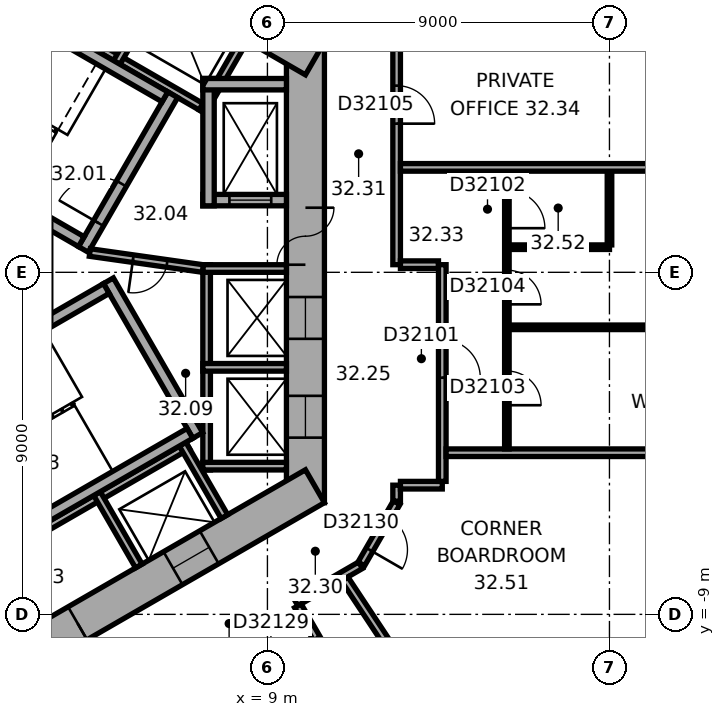
"""IFC4 building model, lengths in metres.
Left out: names, types, materials, properties, quantities, classifications, styles, units other than length and angle.
Written with IfcOpenShell. Run it as: python <this file> out.ifc"""

import sys

from ifc_helpers import new_model, si_unit, direction, frame, frame_2d, origin, place, context, subcontext, project, spatial, rectangle, extrude, element, fill, save


model = new_model("IFC4")
c1 = context("Model", 3, precision=1e-05, world=origin(), true_north=direction((0.0, 1.0)))
c2 = subcontext(c1, "Body", "Model", "MODEL_VIEW")
j1 = project(units=[si_unit("LENGTHUNIT", "METRE"), si_unit("PLANEANGLEUNIT", "RADIAN")], contexts=[c1])
p1 = place(None, origin())
s1 = spatial("IfcSite", under=j1, at=p1, CompositionType="ELEMENT")
p2 = place(p1, origin())
s2 = spatial("IfcBuilding", under=s1, at=p2, CompositionType="ELEMENT")
p3 = place(p2, frame((0.0, 0.0, 131.8)))
s3 = spatial("IfcBuildingStorey", under=s2, at=p3, CompositionType="ELEMENT", Elevation=131.8)
p4 = place(p3, frame((10.0, -6.062, 0.0), z_axis=(0.0, 0.0, 1.0), x_axis=(0.0, 1.0, 0.0)))
e1 = element("IfcWall", 1, at=p4, inside=s3, PredefinedType="SHEAR", context=c2, shape_type="SweptSolid", body=[
    extrude(rectangle(XDim=12.125, YDim=1.0, at=frame_2d((6.062, 0.0))), origin(), (0.0, 0.0, 1.0), 3.7),
])
p5 = place(p4, frame((6.262, 0.0, 0.0)))
e2 = element("IfcOpeningElement", 2, at=p5, cuts=e1, PredefinedType="OPENING", context=c2, shape_type="SweptSolid", body=[
    extrude(rectangle(XDim=1.5, YDim=2.1, at=frame_2d((0.75, 1.05))), frame((0.0, 0.51, 0.0), z_axis=(0.0, -1.0, 0.0), x_axis=(1.0, 0.0, 0.0)), (0.0, 0.0, 1.0), 1.02),
])
p6 = place(p4, frame((1.712, 0.0, 0.0)))
e3 = element("IfcOpeningElement", 3, at=p6, cuts=e1, PredefinedType="OPENING", context=c2, shape_type="SweptSolid", body=[
    extrude(rectangle(XDim=1.1, YDim=2.1, at=frame_2d((0.55, 1.05))), frame((0.0, 0.51, 0.0), z_axis=(0.0, -1.0, 0.0), x_axis=(1.0, 0.0, 0.0)), (0.0, 0.0, 1.0), 1.02),
])
p7 = place(p4, frame((4.312, 0.0, 0.0)))
e4 = element("IfcOpeningElement", 4, at=p7, cuts=e1, PredefinedType="OPENING", context=c2, shape_type="SweptSolid", body=[
    extrude(rectangle(XDim=1.1, YDim=2.1, at=frame_2d((0.55, 1.05))), frame((0.0, 0.51, 0.0), z_axis=(0.0, -1.0, 0.0), x_axis=(1.0, 0.0, 0.0)), (0.0, 0.0, 1.0), 1.02),
])
p8 = place(p3, frame((10.25, 5.629, 0.0), z_axis=(0.0, 0.0, 1.0), x_axis=(-0.866022616891, 0.50000482701, 0.0)))
e5 = element("IfcWall", 5, at=p8, inside=s3, PredefinedType="SHEAR", context=c2, shape_type="SweptSolid", body=[
    extrude(rectangle(XDim=12.125, YDim=1.0, at=frame_2d((6.062, 0.0))), origin(), (0.0, 0.0, 1.0), 3.7),
])
p9 = place(p8, frame((2.612, 0.0, 0.0)))
e6 = element("IfcOpeningElement", 6, at=p9, cuts=e5, PredefinedType="OPENING", context=c2, shape_type="SweptSolid", body=[
    extrude(rectangle(XDim=1.1, YDim=2.1, at=frame_2d((0.55, 1.05))), frame((0.0, 0.51, 0.0), z_axis=(0.0, -1.0, 0.0), x_axis=(1.0, 0.0, 0.0)), (0.0, 0.0, 1.0), 1.02),
])
p10 = place(p8, frame((5.212, 0.0, 0.0)))
e7 = element("IfcOpeningElement", 7, at=p10, cuts=e5, PredefinedType="OPENING", context=c2, shape_type="SweptSolid", body=[
    extrude(rectangle(XDim=1.1, YDim=2.1, at=frame_2d((0.55, 1.05))), frame((0.0, 0.51, 0.0), z_axis=(0.0, -1.0, 0.0), x_axis=(1.0, 0.0, 0.0)), (0.0, 0.0, 1.0), 1.02),
])
p11 = place(p8, frame((7.812, 0.0, 0.0)))
e8 = element("IfcOpeningElement", 8, at=p11, cuts=e5, PredefinedType="OPENING", context=c2, shape_type="SweptSolid", body=[
    extrude(rectangle(XDim=1.1, YDim=2.1, at=frame_2d((0.55, 1.05))), frame((0.0, 0.51, 0.0), z_axis=(0.0, -1.0, 0.0), x_axis=(1.0, 0.0, 0.0)), (0.0, 0.0, 1.0), 1.02),
])
p12 = place(p3, frame((-0.25, -11.691, 0.0), z_axis=(0.0, 0.0, 1.0), x_axis=(0.866022616891, 0.50000482701, 0.0)))
e9 = element("IfcWall", 9, at=p12, inside=s3, PredefinedType="SHEAR", context=c2, shape_type="SweptSolid", body=[
    extrude(rectangle(XDim=12.125, YDim=1.0, at=frame_2d((6.062, 0.0))), origin(), (0.0, 0.0, 1.0), 3.7),
])
p13 = place(p12, frame((4.012, 0.0, 0.0)))
e10 = element("IfcOpeningElement", 10, at=p13, cuts=e9, PredefinedType="OPENING", context=c2, shape_type="SweptSolid", body=[
    extrude(rectangle(XDim=0.9, YDim=2.1, at=frame_2d((0.45, 1.05))), frame((0.0, 0.51, 0.0), z_axis=(0.0, -1.0, 0.0), x_axis=(1.0, 0.0, 0.0)), (0.0, 0.0, 1.0), 1.02),
])
p14 = place(p12, frame((7.812, 0.0, 0.0)))
e11 = element("IfcOpeningElement", 11, at=p14, cuts=e9, PredefinedType="OPENING", context=c2, shape_type="SweptSolid", body=[
    extrude(rectangle(XDim=1.1, YDim=2.1, at=frame_2d((0.55, 1.05))), frame((0.0, 0.51, 0.0), z_axis=(0.0, -1.0, 0.0), x_axis=(1.0, 0.0, 0.0)), (0.0, 0.0, 1.0), 1.02),
])
p15 = place(p3, frame((7.4, -5.2, 0.0), z_axis=(0.0, 0.0, 1.0), x_axis=(0.0, 1.0, 0.0)))
e12 = element("IfcWall", 12, at=p15, inside=s3, PredefinedType="PARTITIONING", context=c2, shape_type="SweptSolid", body=[
    extrude(rectangle(XDim=5.4, YDim=0.2, at=frame_2d((2.7, 0.0))), origin(), (0.0, 0.0, 1.0), 3.42),
])
for number, where, z_axis, x_axis in (
    (13, (7.3, -5.1, 0.0), (0.0, 0.0, 1.0), (1.0, 0.0, 0.0)),
    (14, (7.3, -2.5, 0.0), (0.0, 0.0, 1.0), (1.0, 0.0, 0.0)),
    (15, (7.3, 0.1, 0.0), (0.0, 0.0, 1.0), (1.0, 0.0, 0.0)),
):
    element("IfcWall", number, at=place(p3, frame(where, z_axis=z_axis, x_axis=x_axis)), inside=s3, PredefinedType="PARTITIONING", context=c2, shape_type="SweptSolid", body=[
        extrude(rectangle(XDim=2.2, YDim=0.2, at=frame_2d((1.1, 0.0))), origin(), (0.0, 0.0, 1.0), 3.42),
    ])
p16 = place(p3, frame((7.424, 4.259, 0.0), z_axis=(0.0, 0.0, 1.0), x_axis=(-0.866026010844, 0.49999894854, 0.0)))
e16 = element("IfcWall", 16, at=p16, inside=s3, PredefinedType="PARTITIONING", context=c2, shape_type="SweptSolid", body=[
    extrude(rectangle(XDim=8.0, YDim=0.2, at=frame_2d((4.0, 0.0))), origin(), (0.0, 0.0, 1.0), 3.42),
])
for number, where, z_axis, x_axis in (
    (17, (7.287, 4.222, 0.0), (0.0, 0.0, 1.0), (0.5, 0.866, 0.0)),
    (18, (5.036, 5.522, 0.0), (0.0, 0.0, 1.0), (0.5, 0.866, 0.0)),
):
    element("IfcWall", number, at=place(p3, frame(where, z_axis=z_axis, x_axis=x_axis)), inside=s3, PredefinedType="PARTITIONING", context=c2, shape_type="SweptSolid", body=[
        extrude(rectangle(XDim=2.2, YDim=0.2, at=frame_2d((1.1, 0.0))), origin(), (0.0, 0.0, 1.0), 3.42),
    ])
p17 = place(p3, frame((-0.024, -8.559, 0.0), z_axis=(0.0, 0.0, 1.0), x_axis=(0.866026010844, 0.49999894854, 0.0)))
e19 = element("IfcWall", 19, at=p17, inside=s3, PredefinedType="PARTITIONING", context=c2, shape_type="SweptSolid", body=[
    extrude(rectangle(XDim=8.0, YDim=0.2, at=frame_2d((4.0, 0.0))), origin(), (0.0, 0.0, 1.0), 3.42),
])
for number, where, z_axis, x_axis in (
    (20, (4.516, -5.822, 0.0), (0.0, 0.0, 1.0), (0.5, -0.866, 0.0)),
    (21, (6.768, -4.522, 0.0), (0.0, 0.0, 1.0), (0.5, -0.866, 0.0)),
):
    element("IfcWall", number, at=place(p3, frame(where, z_axis=z_axis, x_axis=x_axis)), inside=s3, PredefinedType="PARTITIONING", context=c2, shape_type="SweptSolid", body=[
        extrude(rectangle(XDim=2.2, YDim=0.2, at=frame_2d((1.1, 0.0))), origin(), (0.0, 0.0, 1.0), 3.42),
    ])
p18 = place(p3, frame((4.158, 0.602, 0.0), z_axis=(0.0, 0.0, 1.0), x_axis=(0.499977259774, 0.866038532462, 0.0)))
e22 = element("IfcWall", 22, at=p18, inside=s3, PredefinedType="SHEAR", context=c2, shape_type="SweptSolid", body=[
    extrude(rectangle(XDim=4.7, YDim=0.3, at=frame_2d((2.35, 0.0))), origin(), (0.0, 0.0, 1.0), 3.42),
])
p19 = place(p18, frame((0.8, 0.0, 0.0)))
e23 = element("IfcOpeningElement", 23, at=p19, cuts=e22, PredefinedType="OPENING", context=c2, shape_type="SweptSolid", body=[
    extrude(rectangle(XDim=1.2, YDim=2.1, at=frame_2d((0.6, 1.05))), frame((0.0, 0.16, 0.0), z_axis=(0.0, -1.0, 0.0), x_axis=(1.0, 0.0, 0.0)), (0.0, 0.0, 1.0), 0.32),
])
for number, where, z_axis, x_axis in (
    (24, (4.103, 0.807, 0.0), (0.0, 0.0, 1.0), (-0.866, 0.5, 0.0)),
    (25, (6.303, 4.617, 0.0), (0.0, 0.0, 1.0), (-0.866, 0.5, 0.0)),
):
    element("IfcWall", number, at=place(p3, frame(where, z_axis=z_axis, x_axis=x_axis)), inside=s3, PredefinedType="SHEAR", context=c2, shape_type="SweptSolid", body=[
        extrude(rectangle(XDim=7.06, YDim=0.3, at=frame_2d((3.53, 0.0))), origin(), (0.0, 0.0, 1.0), 3.42),
    ])
p20 = place(p3, frame((4.816, -0.222, 0.0), z_axis=(0.0, 0.0, 1.0), x_axis=(0.499977259774, -0.866038532462, 0.0)))
e26 = element("IfcWall", 26, at=p20, inside=s3, PredefinedType="SHEAR", context=c2, shape_type="SweptSolid", body=[
    extrude(rectangle(XDim=4.7, YDim=0.3, at=frame_2d((2.35, 0.0))), origin(), (0.0, 0.0, 1.0), 3.42),
])
for number, where, z_axis, x_axis in (
    (27, (-1.353, -3.957, 0.0), (0.0, 0.0, 1.0), (0.866, 0.5, 0.0)),
    (28, (0.847, -7.767, 0.0), (0.0, 0.0, 1.0), (0.866, 0.5, 0.0)),
):
    element("IfcWall", number, at=place(p3, frame(where, z_axis=z_axis, x_axis=x_axis)), inside=s3, PredefinedType="SHEAR", context=c2, shape_type="SweptSolid", body=[
        extrude(rectangle(XDim=7.06, YDim=0.3, at=frame_2d((3.53, 0.0))), origin(), (0.0, 0.0, 1.0), 3.42),
    ])
p21 = place(p3, frame((7.3, 1.9, 0.0), z_axis=(0.0, 0.0, 1.0), x_axis=(1.0, 0.0, 0.0)))
e29 = element("IfcWall", 29, at=p21, inside=s3, PredefinedType="SHEAR", context=c2, shape_type="SweptSolid", body=[
    extrude(rectangle(XDim=2.2, YDim=0.3, at=frame_2d((1.1, 0.0))), origin(), (0.0, 0.0, 1.0), 3.42),
])
p22 = place(p21, frame((0.7, 0.0, 0.0)))
e30 = element("IfcOpeningElement", 30, at=p22, cuts=e29, PredefinedType="OPENING", context=c2, shape_type="SweptSolid", body=[
    extrude(rectangle(XDim=1.1, YDim=2.1, at=frame_2d((0.55, 1.05))), frame((0.0, 0.16, 0.0), z_axis=(0.0, -1.0, 0.0), x_axis=(1.0, 0.0, 0.0)), (0.0, 0.0, 1.0), 0.32),
])
p23 = place(p3, frame((7.45, 1.75, 0.0), z_axis=(0.0, 0.0, 1.0), x_axis=(0.0, 1.0, 0.0)))
e31 = element("IfcWall", 31, at=p23, inside=s3, PredefinedType="SHEAR", context=c2, shape_type="SweptSolid", body=[
    extrude(rectangle(XDim=3.35, YDim=0.3, at=frame_2d((1.675, 0.0))), origin(), (0.0, 0.0, 1.0), 3.42),
])
p24 = place(p3, frame((7.3, 4.95, 0.0), z_axis=(0.0, 0.0, 1.0), x_axis=(1.0, 0.0, 0.0)))
e32 = element("IfcWall", 32, at=p24, inside=s3, PredefinedType="SHEAR", context=c2, shape_type="SweptSolid", body=[
    extrude(rectangle(XDim=2.2, YDim=0.3, at=frame_2d((1.1, 0.0))), origin(), (0.0, 0.0, 1.0), 3.42),
])
p25 = place(p3, frame((4.327, 0.521, 0.0), z_axis=(0.0, 0.0, 1.0), x_axis=(0.990124376366, -0.14019172346, 0.0)))
e33 = element("IfcWall", 33, at=p25, inside=s3, PredefinedType="PARTITIONING", context=c2, shape_type="SweptSolid", body=[
    extrude(rectangle(XDim=3.002, YDim=0.2, at=frame_2d((1.501, 0.0))), origin(), (0.0, 0.0, 1.0), 3.42),
])
p26 = place(p25, frame((1.15, 0.0, 0.0)))
e34 = element("IfcOpeningElement", 34, at=p26, cuts=e33, PredefinedType="OPENING", context=c2, shape_type="SweptSolid", body=[
    extrude(rectangle(XDim=0.9, YDim=2.1, at=frame_2d((0.45, 1.05))), frame((0.0, 0.11, 0.0), z_axis=(0.0, -1.0, 0.0), x_axis=(1.0, 0.0, 0.0)), (0.0, 0.0, 1.0), 0.22),
])
p27 = place(p3, frame((9.752, -8.688, 0.0), z_axis=(0.0, 0.0, 1.0), x_axis=(0.865974105138, 0.500088841337, 0.0)))
e35 = element("IfcWall", 35, at=p27, inside=s3, PredefinedType="PARTITIONING", context=c2, shape_type="SweptSolid", body=[
    extrude(rectangle(XDim=1.961, YDim=0.2, at=frame_2d((0.98, 0.0))), origin(), (0.0, 0.0, 1.0), 3.42),
])
p28 = place(p3, frame((10.302, -9.642, 0.0), z_axis=(0.0, 0.0, 1.0), x_axis=(-0.500074377092, 0.865982457891, 0.0)))
e36 = element("IfcWall", 36, at=p28, inside=s3, PredefinedType="PARTITIONING", context=c2, shape_type="SweptSolid", body=[
    extrude(rectangle(XDim=1.001, YDim=0.2, at=frame_2d((0.5, 0.0))), origin(), (0.0, 0.0, 1.0), 3.42),
])
p29 = place(p3, frame((11.47, -7.673, 0.0), z_axis=(0.0, 0.0, 1.0), x_axis=(0.499964847546, 0.866045698112, 0.0)))
e37 = element("IfcWall", 37, at=p29, inside=s3, PredefinedType="PARTITIONING", context=c2, shape_type="SweptSolid", body=[
    extrude(rectangle(XDim=1.86, YDim=0.2, at=frame_2d((0.93, 0.0))), origin(), (0.0, 0.0, 1.0), 3.42),
])
p30 = place(p29, frame((0.43, 0.0, 0.0)))
e38 = element("IfcOpeningElement", 38, at=p30, cuts=e37, PredefinedType="OPENING", context=c2, shape_type="SweptSolid", body=[
    extrude(rectangle(XDim=1.0, YDim=2.1, at=frame_2d((0.5, 1.05))), frame((0.0, 0.11, 0.0), z_axis=(0.0, -1.0, 0.0), x_axis=(1.0, 0.0, 0.0)), (0.0, 0.0, 1.0), 0.22),
])
p31 = place(p3, frame((12.4, -6.022, 0.0), z_axis=(0.0, 0.0, 1.0), x_axis=(0.0, 1.0, 0.0)))
e39 = element("IfcWall", 39, at=p31, inside=s3, PredefinedType="PARTITIONING", context=c2, shape_type="SweptSolid", body=[
    extrude(rectangle(XDim=0.421, YDim=0.2, at=frame_2d((0.21, 0.0))), origin(), (0.0, 0.0, 1.0), 3.42),
])
p32 = place(p3, frame((12.4, 0.201, 0.0), z_axis=(0.0, 0.0, 1.0), x_axis=(0.0, 1.0, 0.0)))
e40 = element("IfcWall", 40, at=p32, inside=s3, PredefinedType="PARTITIONING", context=c2, shape_type="SweptSolid", body=[
    extrude(rectangle(XDim=5.861, YDim=0.2, at=frame_2d((2.931, 0.0))), origin(), (0.0, 0.0, 1.0), 3.42),
])
p33 = place(p32, frame((3.711, 0.0, 0.0)))
e41 = element("IfcOpeningElement", 41, at=p33, cuts=e40, PredefinedType="OPENING", context=c2, shape_type="SweptSolid", body=[
    extrude(rectangle(XDim=1.0, YDim=2.1, at=frame_2d((0.5, 1.05))), frame((0.0, 0.11, 0.0), z_axis=(0.0, -1.0, 0.0), x_axis=(1.0, 0.0, 0.0)), (0.0, 0.0, 1.0), 0.22),
])
p34 = place(p3, frame((12.5, -5.601, 0.0), z_axis=(0.0, 0.0, 1.0), x_axis=(1.0, 0.0, 0.0)))
e42 = element("IfcWall", 42, at=p34, inside=s3, PredefinedType="PARTITIONING", context=c2, shape_type="SweptSolid", body=[
    extrude(rectangle(XDim=1.101, YDim=0.2, at=frame_2d((0.551, 0.0))), origin(), (0.0, 0.0, 1.0), 3.42),
])
p35 = place(p3, frame((13.501, 0.201, 0.0), z_axis=(0.0, 0.0, 1.0), x_axis=(-1.0, 0.0, 0.0)))
e43 = element("IfcWall", 43, at=p35, inside=s3, PredefinedType="PARTITIONING", context=c2, shape_type="SweptSolid", body=[
    extrude(rectangle(XDim=1.001, YDim=0.2, at=frame_2d((0.5, 0.0))), origin(), (0.0, 0.0, 1.0), 3.42),
])
p36 = place(p3, frame((13.601, -5.501, 0.0), z_axis=(0.0, 0.0, 1.0), x_axis=(0.0, 1.0, 0.0)))
e44 = element("IfcWall", 44, at=p36, inside=s3, PredefinedType="PARTITIONING", context=c2, shape_type="SweptSolid", body=[
    extrude(rectangle(XDim=5.702, YDim=0.2, at=frame_2d((2.851, 0.0))), origin(), (0.0, 0.0, 1.0), 3.42),
])
p37 = place(p36, frame((2.728, 0.0, 0.0)))
e45 = element("IfcOpeningElement", 45, at=p37, cuts=e44, PredefinedType="OPENING", context=c2, shape_type="SweptSolid", body=[
    extrude(rectangle(XDim=1.0, YDim=2.1, at=frame_2d((0.5, 1.05))), frame((0.0, 0.11, 0.0), z_axis=(0.0, -1.0, 0.0), x_axis=(1.0, 0.0, 0.0)), (0.0, 0.0, 1.0), 0.22),
])
p38 = place(p3, frame((13.701, -4.747, 0.0), z_axis=(0.0, 0.0, 1.0), x_axis=(1.0, 0.0, 0.0)))
e46 = element("IfcWall", 46, at=p38, inside=s3, PredefinedType="PARTITIONING", context=c2, shape_type="SweptSolid", body=[
    extrude(rectangle(XDim=7.049, YDim=0.2, at=frame_2d((3.524, 0.0))), origin(), (0.0, 0.0, 1.0), 3.42),
])
p39 = place(p3, frame((15.301, -4.647, 0.0), z_axis=(0.0, 0.0, 1.0), x_axis=(0.0, 1.0, 0.0)))
e47 = element("IfcWall", 47, at=p39, inside=s3, PredefinedType="PARTITIONING", context=c2, shape_type="SweptSolid", body=[
    extrude(rectangle(XDim=7.308, YDim=0.12, at=frame_2d((3.654, 0.0))), origin(), (0.0, 0.0, 1.0), 3.42),
])
p40 = place(p39, frame((5.808, 0.0, 0.0)))
e48 = element("IfcOpeningElement", 48, at=p40, cuts=e47, PredefinedType="OPENING", context=c2, shape_type="SweptSolid", body=[
    extrude(rectangle(XDim=1.0, YDim=2.1, at=frame_2d((0.5, 1.05))), frame((0.0, 0.07, 0.0), z_axis=(0.0, -1.0, 0.0), x_axis=(1.0, 0.0, 0.0)), (0.0, 0.0, 1.0), 0.14),
])
p41 = place(p39, frame((1.15, 0.0, 0.0)))
e49 = element("IfcOpeningElement", 49, at=p41, cuts=e47, PredefinedType="OPENING", context=c2, shape_type="SweptSolid", body=[
    extrude(rectangle(XDim=0.9, YDim=2.1, at=frame_2d((0.45, 1.05))), frame((0.0, 0.07, 0.0), z_axis=(0.0, -1.0, 0.0), x_axis=(1.0, 0.0, 0.0)), (0.0, 0.0, 1.0), 0.14),
])
p42 = place(p39, frame((3.804, 0.0, 0.0)))
e50 = element("IfcOpeningElement", 50, at=p42, cuts=e47, PredefinedType="OPENING", context=c2, shape_type="SweptSolid", body=[
    extrude(rectangle(XDim=0.9, YDim=2.1, at=frame_2d((0.45, 1.05))), frame((0.0, 0.07, 0.0), z_axis=(0.0, -1.0, 0.0), x_axis=(1.0, 0.0, 0.0)), (0.0, 0.0, 1.0), 0.14),
])
p43 = place(p3, frame((15.361, 0.661, 0.0), z_axis=(0.0, 0.0, 1.0), x_axis=(1.0, 0.0, 0.0)))
e51 = element("IfcWall", 51, at=p43, inside=s3, PredefinedType="PARTITIONING", context=c2, shape_type="SweptSolid", body=[
    extrude(rectangle(XDim=2.64, YDim=0.12, at=frame_2d((1.32, 0.0))), origin(), (0.0, 0.0, 1.0), 3.42),
])
p44 = place(p3, frame((15.411, -14.683, 0.0), z_axis=(0.0, 0.0, 1.0), x_axis=(-0.551932106251, 0.833889051427, 0.0)))
e52 = element("IfcWall", 52, at=p44, inside=s3, PredefinedType="PARTITIONING", context=c2, shape_type="SweptSolid", body=[
    extrude(rectangle(XDim=7.926, YDim=0.2, at=frame_2d((3.963, 0.0))), origin(), (0.0, 0.0, 1.0), 2.87),
])
p45 = place(p3, frame((18.001, 0.721, 0.0), z_axis=(0.0, 0.0, 1.0), x_axis=(0.0, 1.0, 0.0)))
e53 = element("IfcWall", 53, at=p45, inside=s3, PredefinedType="PARTITIONING", context=c2, shape_type="SweptSolid", body=[
    extrude(rectangle(XDim=1.94, YDim=0.12, at=frame_2d((0.97, 0.0))), origin(), (0.0, 0.0, 1.0), 3.42),
])
p46 = place(p3, frame((20.75, -1.447, 0.0), z_axis=(0.0, 0.0, 1.0), x_axis=(-1.0, 0.0, 0.0)))
e54 = element("IfcWall", 54, at=p46, inside=s3, PredefinedType="PARTITIONING", context=c2, shape_type="SweptSolid", body=[
    extrude(rectangle(XDim=5.389, YDim=0.12, at=frame_2d((2.694, 0.0))), origin(), (0.0, 0.0, 1.0), 2.87),
])
p47 = place(p3, frame((20.75, 2.761, 0.0), z_axis=(0.0, 0.0, 1.0), x_axis=(-1.0, 0.0, 0.0)))
e55 = element("IfcWall", 55, at=p47, inside=s3, PredefinedType="PARTITIONING", context=c2, shape_type="SweptSolid", body=[
    extrude(rectangle(XDim=8.25, YDim=0.2, at=frame_2d((4.125, 0.0))), origin(), (0.0, 0.0, 1.0), 3.42),
])
p48 = place(p5, origin())
e56 = element("IfcDoor", 56, at=p48, inside=s3, OperationType="DOUBLE_DOOR_SINGLE_SWING", PredefinedType="DOOR", context=c2, shape_type="SweptSolid", body=[
    extrude(rectangle(XDim=1.5, YDim=2.1, at=frame_2d((0.75, 1.05))), frame((0.0, 0.025, 0.0), z_axis=(0.0, -1.0, 0.0), x_axis=(1.0, 0.0, 0.0)), (0.0, 0.0, 1.0), 0.05),
])
fill(e2, e56)
p49 = place(p19, origin())
e57 = element("IfcDoor", 57, at=p49, inside=s3, OperationType="SINGLE_SWING_RIGHT", PredefinedType="DOOR", context=c2, shape_type="SweptSolid", body=[
    extrude(rectangle(XDim=1.2, YDim=2.1, at=frame_2d((0.6, 1.05))), frame((0.0, 0.025, 0.0), z_axis=(0.0, -1.0, 0.0), x_axis=(1.0, 0.0, 0.0)), (0.0, 0.0, 1.0), 0.05),
])
fill(e23, e57)
p50 = place(p26, origin())
e58 = element("IfcDoor", 58, at=p50, inside=s3, OperationType="SINGLE_SWING_LEFT", PredefinedType="DOOR", context=c2, shape_type="SweptSolid", body=[
    extrude(rectangle(XDim=0.9, YDim=2.1, at=frame_2d((0.45, 1.05))), frame((0.0, 0.025, 0.0), z_axis=(0.0, -1.0, 0.0), x_axis=(1.0, 0.0, 0.0)), (0.0, 0.0, 1.0), 0.05),
])
fill(e34, e58)
p51 = place(p13, origin())
e59 = element("IfcDoor", 59, at=p51, inside=s3, OperationType="SINGLE_SWING_LEFT", PredefinedType="DOOR", context=c2, shape_type="SweptSolid", body=[
    extrude(rectangle(XDim=0.9, YDim=2.1, at=frame_2d((0.45, 1.05))), frame((0.0, 0.025, 0.0), z_axis=(0.0, -1.0, 0.0), x_axis=(1.0, 0.0, 0.0)), (0.0, 0.0, 1.0), 0.05),
])
fill(e10, e59)
p52 = place(p22, origin())
e60 = element("IfcDoor", 60, at=p52, inside=s3, OperationType="DOUBLE_DOOR_SLIDING", PredefinedType="DOOR", context=c2, shape_type="SweptSolid", body=[
    extrude(rectangle(XDim=1.1, YDim=2.1, at=frame_2d((0.55, 1.05))), frame((0.0, 0.025, 0.0), z_axis=(0.0, -1.0, 0.0), x_axis=(1.0, 0.0, 0.0)), (0.0, 0.0, 1.0), 0.05),
])
fill(e30, e60)
p53 = place(p6, origin())
e61 = element("IfcDoor", 61, at=p53, inside=s3, OperationType="DOUBLE_DOOR_SLIDING", PredefinedType="DOOR", context=c2, shape_type="SweptSolid", body=[
    extrude(rectangle(XDim=1.1, YDim=2.1, at=frame_2d((0.55, 1.05))), frame((0.0, 0.025, 0.0), z_axis=(0.0, -1.0, 0.0), x_axis=(1.0, 0.0, 0.0)), (0.0, 0.0, 1.0), 0.05),
])
fill(e3, e61)
p54 = place(p7, origin())
e62 = element("IfcDoor", 62, at=p54, inside=s3, OperationType="DOUBLE_DOOR_SLIDING", PredefinedType="DOOR", context=c2, shape_type="SweptSolid", body=[
    extrude(rectangle(XDim=1.1, YDim=2.1, at=frame_2d((0.55, 1.05))), frame((0.0, 0.025, 0.0), z_axis=(0.0, -1.0, 0.0), x_axis=(1.0, 0.0, 0.0)), (0.0, 0.0, 1.0), 0.05),
])
fill(e4, e62)
p55 = place(p14, origin())
e63 = element("IfcDoor", 63, at=p55, inside=s3, OperationType="DOUBLE_DOOR_SLIDING", PredefinedType="DOOR", context=c2, shape_type="SweptSolid", body=[
    extrude(rectangle(XDim=1.1, YDim=2.1, at=frame_2d((0.55, 1.05))), frame((0.0, 0.025, 0.0), z_axis=(0.0, -1.0, 0.0), x_axis=(1.0, 0.0, 0.0)), (0.0, 0.0, 1.0), 0.05),
])
fill(e11, e63)
p56 = place(p37, origin())
e64 = element("IfcDoor", 64, at=p56, inside=s3, OperationType="SINGLE_SWING_LEFT", PredefinedType="DOOR", context=c2, shape_type="SweptSolid", body=[
    extrude(rectangle(XDim=1.0, YDim=2.1, at=frame_2d((0.5, 1.05))), frame((0.0, 0.025, 0.0), z_axis=(0.0, -1.0, 0.0), x_axis=(1.0, 0.0, 0.0)), (0.0, 0.0, 1.0), 0.05),
])
fill(e45, e64)
p57 = place(p40, origin())
e65 = element("IfcDoor", 65, at=p57, inside=s3, OperationType="SINGLE_SWING_LEFT", PredefinedType="DOOR", context=c2, shape_type="SweptSolid", body=[
    extrude(rectangle(XDim=1.0, YDim=2.1, at=frame_2d((0.5, 1.05))), frame((0.0, 0.025, 0.0), z_axis=(0.0, -1.0, 0.0), x_axis=(1.0, 0.0, 0.0)), (0.0, 0.0, 1.0), 0.05),
])
fill(e48, e65)
p58 = place(p41, origin())
e66 = element("IfcDoor", 66, at=p58, inside=s3, OperationType="SINGLE_SWING_LEFT", PredefinedType="DOOR", context=c2, shape_type="SweptSolid", body=[
    extrude(rectangle(XDim=0.9, YDim=2.1, at=frame_2d((0.45, 1.05))), frame((0.0, 0.025, 0.0), z_axis=(0.0, -1.0, 0.0), x_axis=(1.0, 0.0, 0.0)), (0.0, 0.0, 1.0), 0.05),
])
fill(e49, e66)
p59 = place(p42, origin())
e67 = element("IfcDoor", 67, at=p59, inside=s3, OperationType="SINGLE_SWING_LEFT", PredefinedType="DOOR", context=c2, shape_type="SweptSolid", body=[
    extrude(rectangle(XDim=0.9, YDim=2.1, at=frame_2d((0.45, 1.05))), frame((0.0, 0.025, 0.0), z_axis=(0.0, -1.0, 0.0), x_axis=(1.0, 0.0, 0.0)), (0.0, 0.0, 1.0), 0.05),
])
fill(e50, e67)
p60 = place(p33, origin())
e68 = element("IfcDoor", 68, at=p60, inside=s3, OperationType="SINGLE_SWING_LEFT", PredefinedType="DOOR", context=c2, shape_type="SweptSolid", body=[
    extrude(rectangle(XDim=1.0, YDim=2.1, at=frame_2d((0.5, 1.05))), frame((0.0, 0.025, 0.0), z_axis=(0.0, -1.0, 0.0), x_axis=(1.0, 0.0, 0.0)), (0.0, 0.0, 1.0), 0.05),
])
fill(e41, e68)
p61 = place(p30, origin())
e69 = element("IfcDoor", 69, at=p61, inside=s3, OperationType="SINGLE_SWING_LEFT", PredefinedType="DOOR", context=c2, shape_type="SweptSolid", body=[
    extrude(rectangle(XDim=1.0, YDim=2.1, at=frame_2d((0.5, 1.05))), frame((0.0, 0.025, 0.0), z_axis=(0.0, -1.0, 0.0), x_axis=(1.0, 0.0, 0.0)), (0.0, 0.0, 1.0), 0.05),
])
fill(e38, e69)
save(model, sys.argv[1])
